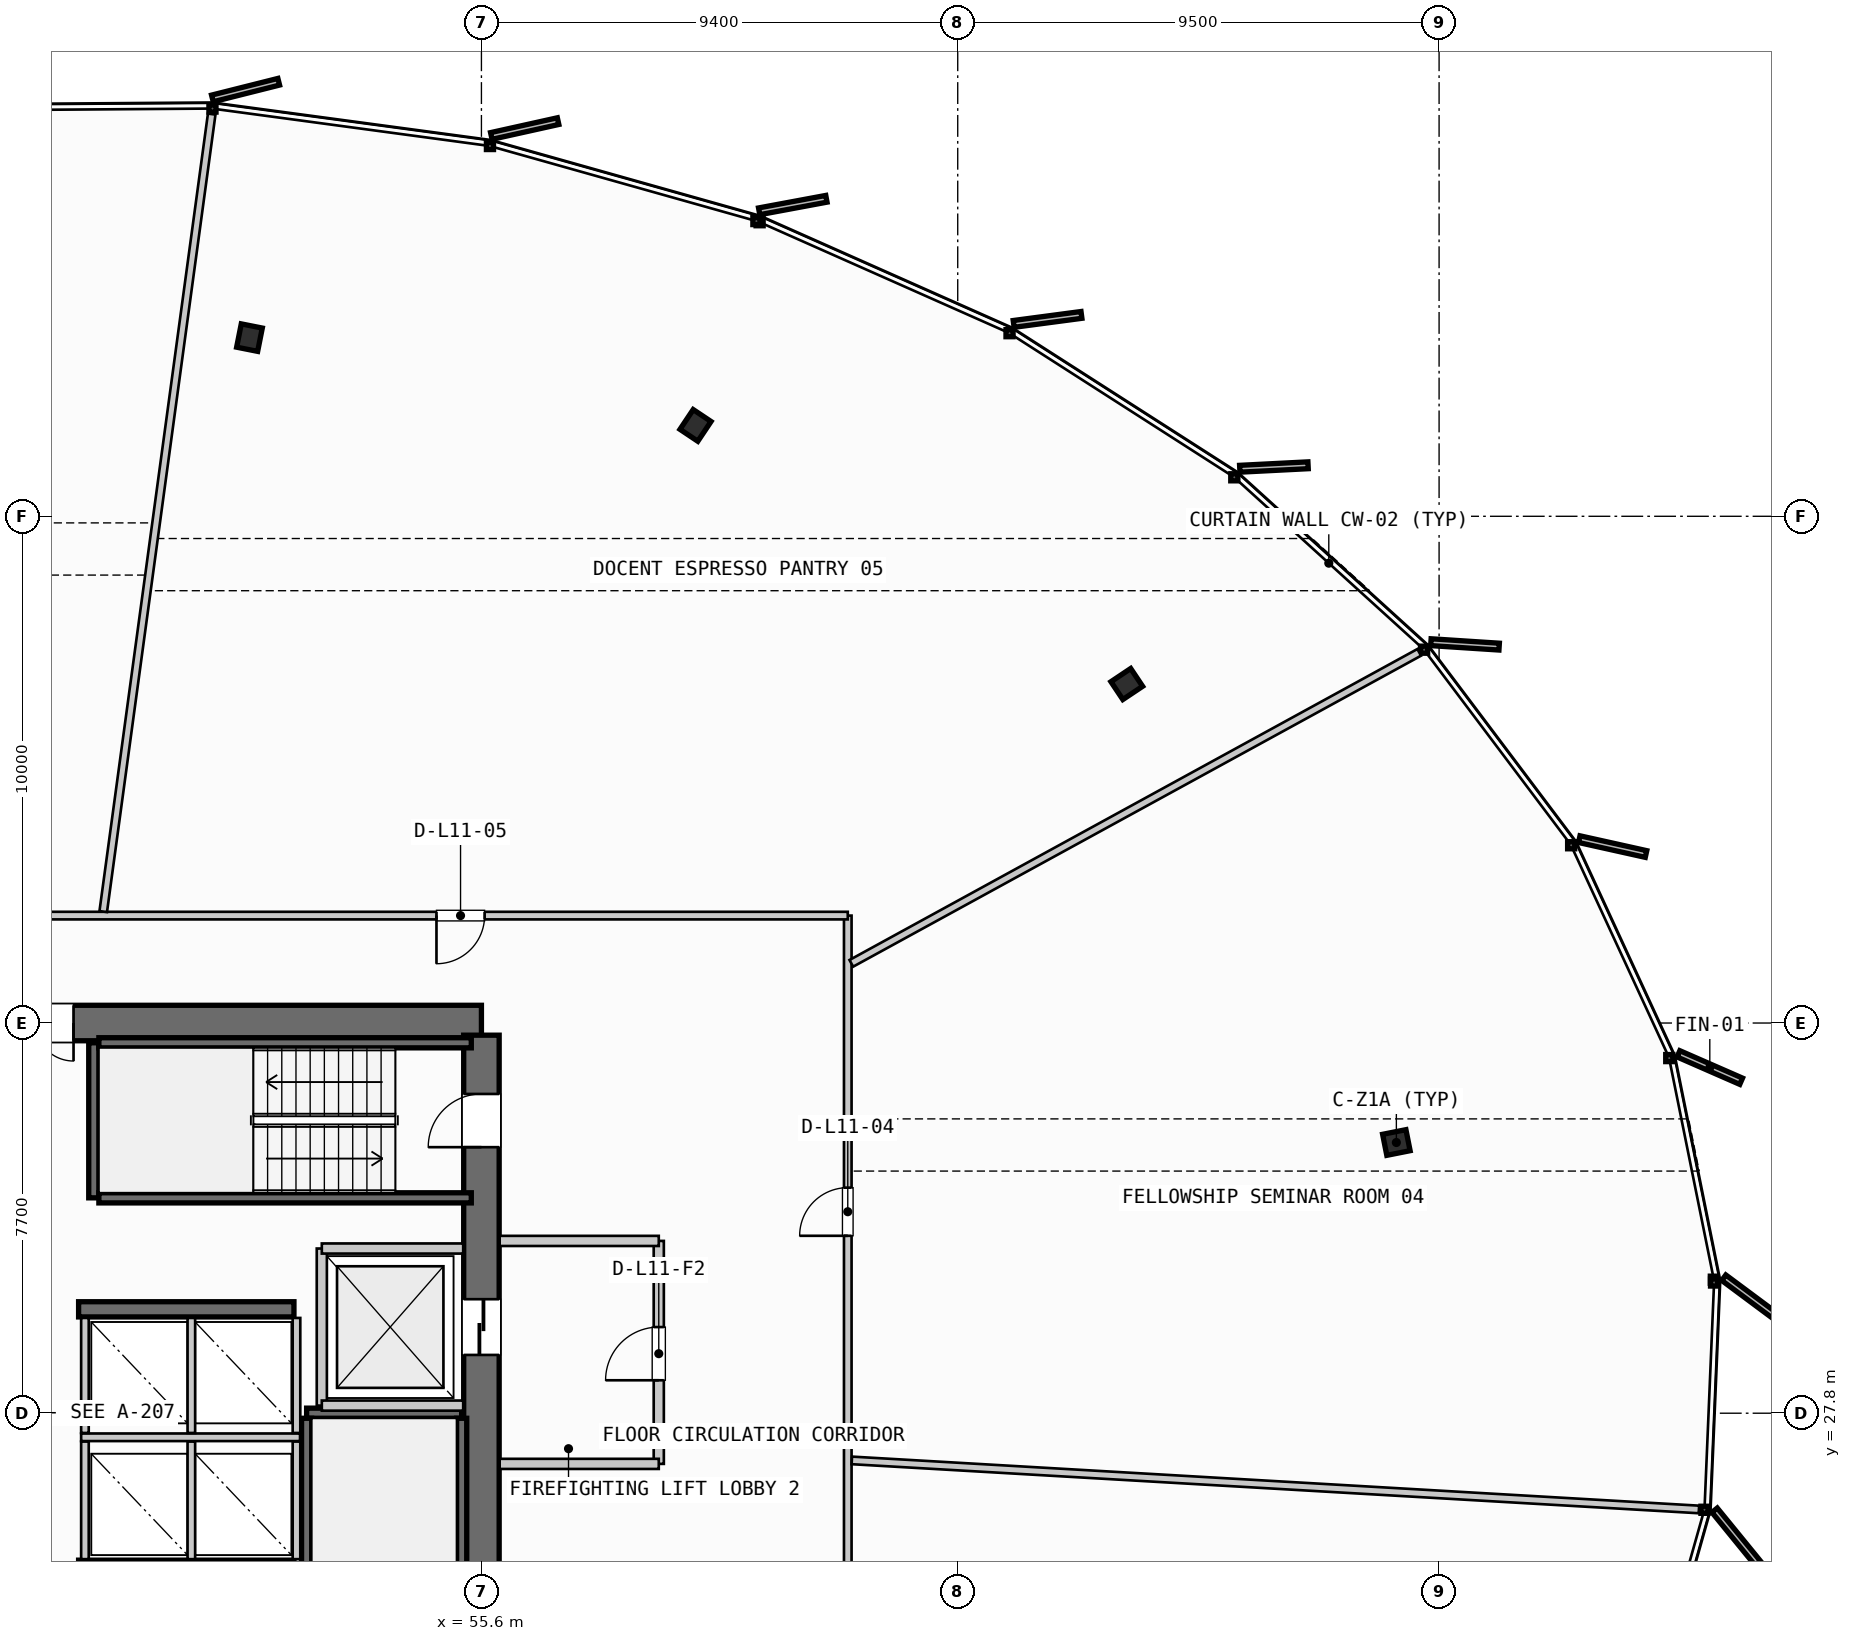
"""IFC4 building model, lengths in metres.
Left out: names, types, materials, properties, quantities, classifications, styles, units other than length and angle.
Written with IfcOpenShell. Run it as: python <this file> out.ifc"""

import sys

from ifc_helpers import new_model, si_unit, direction, frame, frame_2d, origin, origin_2d, place, context, subcontext, project, spatial, rectangle, i_section, extrude, source, transform, mapped, element, fill, save


model = new_model("IFC4")
c1 = context("Model", 3, precision=1e-05, world=origin(), true_north=direction((0.0, 1.0)))
c2 = subcontext(c1, "Body", "Model", "MODEL_VIEW")
j1 = project(units=[si_unit("LENGTHUNIT", "METRE"), si_unit("PLANEANGLEUNIT", "RADIAN")], contexts=[c1])
p1 = place(None, origin())
s1 = spatial("IfcSite", under=j1, at=p1, CompositionType="ELEMENT")
p2 = place(p1, origin())
s2 = spatial("IfcBuilding", under=s1, at=p2, CompositionType="ELEMENT")
p3 = place(p2, frame((0.0, 0.0, 48.6)))
s3 = spatial("IfcBuildingStorey", under=s2, at=p3, CompositionType="ELEMENT", Elevation=48.6)
p4 = place(p3, frame((55.6, 35.5, 0.0), z_axis=(0.0, 0.0, 1.0), x_axis=(-1.0, 0.0, 0.0)))
e1 = element("IfcWall", 1, at=p4, inside=s3, PredefinedType="SHEAR", context=c2, shape_type="SweptSolid", body=[
    extrude(rectangle(XDim=17.6, YDim=0.7, at=frame_2d((8.8, 0.0))), origin(), (0.0, 0.0, 1.0), 3.55),
])
p5 = place(p4, frame((8.05, 0.0, 0.0)))
e2 = element("IfcOpeningElement", 2, at=p5, cuts=e1, PredefinedType="OPENING", context=c2, shape_type="SweptSolid", body=[
    extrude(rectangle(XDim=1.5, YDim=2.2, at=frame_2d((0.75, 1.1))), frame((0.0, 0.36, 0.0), z_axis=(0.0, -1.0, 0.0), x_axis=(1.0, 0.0, 0.0)), (0.0, 0.0, 1.0), 0.72),
])
p6 = place(p4, frame((14.95, 0.0, 0.0)))
e3 = element("IfcOpeningElement", 3, at=p6, cuts=e1, PredefinedType="OPENING", context=c2, shape_type="SweptSolid", body=[
    extrude(rectangle(XDim=1.4, YDim=2.3, at=frame_2d((0.7, 1.15))), frame((0.0, 0.36, 0.0), z_axis=(0.0, -1.0, 0.0), x_axis=(1.0, 0.0, 0.0)), (0.0, 0.0, 1.0), 0.72),
])
p7 = place(p4, frame((12.6, 0.0, 0.0)))
e4 = element("IfcOpeningElement", 4, at=p7, cuts=e1, PredefinedType="OPENING", context=c2, shape_type="SweptSolid", body=[
    extrude(rectangle(XDim=0.95, YDim=2.15, at=frame_2d((0.475, 1.075))), frame((0.0, 0.36, 0.0), z_axis=(0.0, -1.0, 0.0), x_axis=(1.0, 0.0, 0.0)), (0.0, 0.0, 1.0), 0.72),
])
p8 = place(p4, frame((10.45, 0.0, 0.0)))
e5 = element("IfcOpeningElement", 5, at=p8, cuts=e1, PredefinedType="OPENING", context=c2, shape_type="SweptSolid", body=[
    extrude(rectangle(XDim=0.95, YDim=2.15, at=frame_2d((0.475, 1.075))), frame((0.0, 0.36, 0.0), z_axis=(0.0, -1.0, 0.0), x_axis=(1.0, 0.0, 0.0)), (0.0, 0.0, 1.0), 0.72),
])
p9 = place(p3, frame((55.6, 20.34, 0.0), z_axis=(0.0, 0.0, 1.0), x_axis=(0.0, 1.0, 0.0)))
e6 = element("IfcWall", 6, at=p9, inside=s3, PredefinedType="SHEAR", context=c2, shape_type="SweptSolid", body=[
    extrude(rectangle(XDim=14.92, YDim=0.7, at=frame_2d((7.46, 0.0))), origin(), (0.0, 0.0, 1.0), 3.55),
])
p10 = place(p9, frame((12.71, 0.0, 0.0)))
e7 = element("IfcOpeningElement", 7, at=p10, cuts=e6, PredefinedType="OPENING", context=c2, shape_type="SweptSolid", body=[
    extrude(rectangle(XDim=1.05, YDim=2.15, at=frame_2d((0.525, 1.075))), frame((0.0, 0.36, 0.0), z_axis=(0.0, -1.0, 0.0), x_axis=(1.0, 0.0, 0.0)), (0.0, 0.0, 1.0), 0.72),
])
p11 = place(p9, frame((8.61, 0.0, 0.0)))
e8 = element("IfcOpeningElement", 8, at=p11, cuts=e6, PredefinedType="OPENING", context=c2, shape_type="SweptSolid", body=[
    extrude(rectangle(XDim=1.1, YDim=2.2, at=frame_2d((0.55, 1.1))), frame((0.0, 0.36, 0.0), z_axis=(0.0, -1.0, 0.0), x_axis=(1.0, 0.0, 0.0)), (0.0, 0.0, 1.0), 0.72),
])
for number, where, z_axis, x_axis in (
    (9, (47.65, 24.75, 0.0), (0.0, 0.0, 1.0), (1.0, 0.0, 0.0)),
    (10, (47.65, 29.85, 0.0), (0.0, 0.0, 1.0), (1.0, 0.0, 0.0)),
):
    element("IfcWall", number, at=place(p3, frame(where, z_axis=z_axis, x_axis=x_axis)), inside=s3, PredefinedType="SHEAR", context=c2, shape_type="SweptSolid", body=[
        extrude(rectangle(XDim=4.25, YDim=0.3, at=frame_2d((2.125, 0.0))), origin(), (0.0, 0.0, 1.0), 3.55),
    ])
m1 = source(origin(), c2, "Body", "SweptSolid", [
    extrude(i_section(OverallWidth=0.423, OverallDepth=0.469, WebThickness=0.051, FlangeThickness=0.081, FilletRadius=0.015, at=origin_2d()), origin(), (0.0, 0.0, 1.0), 3.55),
])
for number, where, z_axis, x_axis in (
    (11, (73.657, 33.142, 0.0), (0.0, 0.0, 1.0), (0.981, 0.195, 0.0)),
    (12, (68.336, 42.19, 0.0), (0.0, 0.0, 1.0), (0.831, 0.556, 0.0)),
    (13, (59.825, 47.293, 0.0), (0.0, 0.0, 1.0), (0.556, 0.831, 0.0)),
    (14, (51.022, 49.026, 0.0), (0.0, 0.0, 1.0), (0.195, 0.981, 0.0)),
):
    element("IfcColumn", number, at=place(p3, frame(where, z_axis=z_axis, x_axis=x_axis)), inside=s3, PredefinedType="COLUMN", context=c2, shape_type="MappedRepresentation", body=[
        mapped(m1, transform((0.0, 0.0, 0.0), scale=1.0)),
    ])
p12 = place(p3, frame((52.15, 27.8, 0.0), z_axis=(0.0, 0.0, 1.0), x_axis=(1.0, 0.0, 0.0)))
e15 = element("IfcWall", 15, at=p12, inside=s3, PredefinedType="SHEAR", context=c2, shape_type="SweptSolid", body=[
    extrude(rectangle(XDim=3.06, YDim=0.2, at=frame_2d((1.53, 0.0))), origin(), (0.0, 0.0, 1.0), 3.55),
])
for number, where, z_axis, x_axis in (
    (16, (55.21, 27.7, 0.0), (0.0, 0.0, 1.0), (0.0, -1.0, 0.0)),
    (17, (52.15, 20.35, 0.0), (0.0, 0.0, 1.0), (0.0, 1.0, 0.0)),
):
    element("IfcWall", number, at=place(p3, frame(where, z_axis=z_axis, x_axis=x_axis)), inside=s3, PredefinedType="SHEAR", context=c2, shape_type="SweptSolid", body=[
        extrude(rectangle(XDim=7.35, YDim=0.2, at=frame_2d((3.675, 0.0))), origin(), (0.0, 0.0, 1.0), 3.55),
    ])
p13 = place(p3, frame((47.95, 32.05, 0.0), z_axis=(0.0, 0.0, 1.0), x_axis=(0.0, 1.0, 0.0)))
e18 = element("IfcWall", 18, at=p13, inside=s3, PredefinedType="SHEAR", context=c2, shape_type="SweptSolid", body=[
    extrude(rectangle(XDim=3.06, YDim=0.2, at=frame_2d((1.53, 0.0))), origin(), (0.0, 0.0, 1.0), 3.55),
])
for number, where, z_axis, x_axis in (
    (19, (48.05, 35.11, 0.0), (0.0, 0.0, 1.0), (1.0, 0.0, 0.0)),
    (20, (55.4, 32.05, 0.0), (0.0, 0.0, 1.0), (-1.0, 0.0, 0.0)),
):
    element("IfcWall", number, at=place(p3, frame(where, z_axis=z_axis, x_axis=x_axis)), inside=s3, PredefinedType="SHEAR", context=c2, shape_type="SweptSolid", body=[
        extrude(rectangle(XDim=7.35, YDim=0.2, at=frame_2d((3.675, 0.0))), origin(), (0.0, 0.0, 1.0), 3.55),
    ])
p14 = place(p3, frame((52.45, 27.95, 0.0), z_axis=(0.0, 0.0, 1.0), x_axis=(0.0, 1.0, 0.0)))
e21 = element("IfcWall", 21, at=p14, inside=s3, PredefinedType="PARTITIONING", context=c2, shape_type="SweptSolid", body=[
    extrude(rectangle(XDim=3.1, YDim=0.2, at=frame_2d((1.55, 0.0))), origin(), (0.0, 0.0, 1.0), 2.785),
])
for number, where, z_axis, x_axis in (
    (22, (52.45, 27.95, 0.0), (0.0, 0.0, 1.0), (1.0, 0.0, 0.0)),
    (23, (52.45, 31.05, 0.0), (0.0, 0.0, 1.0), (1.0, 0.0, 0.0)),
):
    element("IfcWall", number, at=place(p3, frame(where, z_axis=z_axis, x_axis=x_axis)), inside=s3, PredefinedType="PARTITIONING", context=c2, shape_type="SweptSolid", body=[
        extrude(rectangle(XDim=2.79, YDim=0.2, at=frame_2d((1.395, 0.0))), origin(), (0.0, 0.0, 1.0), 2.785),
    ])
p15 = place(p3, frame((59.1, 26.8, 0.0), z_axis=(0.0, 0.0, 1.0), x_axis=(0.0, 1.0, 0.0)))
e24 = element("IfcWall", 24, at=p15, inside=s3, PredefinedType="PARTITIONING", context=c2, shape_type="SweptSolid", body=[
    extrude(rectangle(XDim=4.4, YDim=0.2, at=frame_2d((2.2, 0.0))), origin(), (0.0, 0.0, 1.0), 2.785),
])
p16 = place(p15, frame((1.65, 0.0, 0.0)))
e25 = element("IfcOpeningElement", 25, at=p16, cuts=e24, PredefinedType="OPENING", context=c2, shape_type="SweptSolid", body=[
    extrude(rectangle(XDim=1.05, YDim=2.15, at=frame_2d((0.525, 1.075))), frame((0.0, 0.11, 0.0), z_axis=(0.0, -1.0, 0.0), x_axis=(1.0, 0.0, 0.0)), (0.0, 0.0, 1.0), 0.22),
])
for number, where, z_axis, x_axis in (
    (26, (55.96, 26.8, 0.0), (0.0, 0.0, 1.0), (1.0, 0.0, 0.0)),
    (27, (55.96, 31.2, 0.0), (0.0, 0.0, 1.0), (1.0, 0.0, 0.0)),
):
    element("IfcWall", number, at=place(p3, frame(where, z_axis=z_axis, x_axis=x_axis)), inside=s3, PredefinedType="PARTITIONING", context=c2, shape_type="SweptSolid", body=[
        extrude(rectangle(XDim=3.14, YDim=0.2, at=frame_2d((1.57, 0.0))), origin(), (0.0, 0.0, 1.0), 2.785),
    ])
p17 = place(p3, frame((47.7, 27.325, 0.0), z_axis=(0.0, 0.0, 1.0), x_axis=(1.0, 0.0, 0.0)))
e28 = element("IfcWall", 28, at=p17, inside=s3, PredefinedType="PARTITIONING", context=c2, shape_type="SweptSolid", body=[
    extrude(rectangle(XDim=4.32, YDim=0.15, at=frame_2d((2.16, 0.0))), origin(), (0.0, 0.0, 1.0), 2.785),
])
for number, where, z_axis, x_axis in (
    (29, (47.775, 24.92, 0.0), (0.0, 0.0, 1.0), (0.0, 1.0, 0.0)),
    (30, (49.875, 24.92, 0.0), (0.0, 0.0, 1.0), (0.0, 1.0, 0.0)),
    (31, (51.95, 24.92, 0.0), (0.0, 0.0, 1.0), (0.0, 1.0, 0.0)),
):
    element("IfcWall", number, at=place(p3, frame(where, z_axis=z_axis, x_axis=x_axis)), inside=s3, PredefinedType="PARTITIONING", context=c2, shape_type="SweptSolid", body=[
        extrude(rectangle(XDim=2.32, YDim=0.15, at=frame_2d((1.16, 0.0))), origin(), (0.0, 0.0, 1.0), 2.785),
    ])
for number, where, z_axis, x_axis in (
    (32, (47.775, 27.41, 0.0), (0.0, 0.0, 1.0), (0.0, 1.0, 0.0)),
    (33, (49.875, 27.41, 0.0), (0.0, 0.0, 1.0), (0.0, 1.0, 0.0)),
    (34, (51.95, 27.41, 0.0), (0.0, 0.0, 1.0), (0.0, 1.0, 0.0)),
):
    element("IfcWall", number, at=place(p3, frame(where, z_axis=z_axis, x_axis=x_axis)), inside=s3, PredefinedType="PARTITIONING", context=c2, shape_type="SweptSolid", body=[
        extrude(rectangle(XDim=2.27, YDim=0.15, at=frame_2d((1.135, 0.0))), origin(), (0.0, 0.0, 1.0), 2.785),
    ])
p18 = place(p3, frame((62.83, 17.14, 0.0), z_axis=(0.0, 0.0, 1.0), x_axis=(0.0, 1.0, 0.0)))
e35 = element("IfcWall", 35, at=p18, inside=s3, PredefinedType="PARTITIONING", context=c2, shape_type="SweptSolid", body=[
    extrude(rectangle(XDim=20.48, YDim=0.15, at=frame_2d((10.24, 0.0))), origin(), (0.0, 0.0, 1.0), 2.785),
])
p19 = place(p18, frame((5.249, 0.0, 0.0)))
e36 = element("IfcOpeningElement", 36, at=p19, cuts=e35, PredefinedType="OPENING", context=c2, shape_type="SweptSolid", body=[
    extrude(rectangle(XDim=0.95, YDim=2.15, at=frame_2d((0.475, 1.075))), frame((0.0, 0.085, 0.0), z_axis=(0.0, -1.0, 0.0), x_axis=(1.0, 0.0, 0.0)), (0.0, 0.0, 1.0), 0.17),
])
p20 = place(p18, frame((14.161, 0.0, 0.0)))
e37 = element("IfcOpeningElement", 37, at=p20, cuts=e35, PredefinedType="OPENING", context=c2, shape_type="SweptSolid", body=[
    extrude(rectangle(XDim=0.95, YDim=2.15, at=frame_2d((0.475, 1.075))), frame((0.0, 0.085, 0.0), z_axis=(0.0, -1.0, 0.0), x_axis=(1.0, 0.0, 0.0)), (0.0, 0.0, 1.0), 0.17),
])
p21 = place(p3, frame((62.83, 37.62, 0.0), z_axis=(0.0, 0.0, 1.0), x_axis=(-1.0, 0.0, 0.0)))
e38 = element("IfcWall", 38, at=p21, inside=s3, PredefinedType="PARTITIONING", context=c2, shape_type="SweptSolid", body=[
    extrude(rectangle(XDim=30.5, YDim=0.15, at=frame_2d((15.25, 0.0))), origin(), (0.0, 0.0, 1.0), 2.785),
])
p22 = place(p21, frame((7.167, 0.0, 0.0)))
e39 = element("IfcOpeningElement", 39, at=p22, cuts=e38, PredefinedType="OPENING", context=c2, shape_type="SweptSolid", body=[
    extrude(rectangle(XDim=0.95, YDim=2.15, at=frame_2d((0.475, 1.075))), frame((0.0, 0.085, 0.0), z_axis=(0.0, -1.0, 0.0), x_axis=(1.0, 0.0, 0.0)), (0.0, 0.0, 1.0), 0.17),
])
p23 = place(p21, frame((21.836, 0.0, 0.0)))
e40 = element("IfcOpeningElement", 40, at=p23, cuts=e38, PredefinedType="OPENING", context=c2, shape_type="SweptSolid", body=[
    extrude(rectangle(XDim=0.95, YDim=2.15, at=frame_2d((0.475, 1.075))), frame((0.0, 0.085, 0.0), z_axis=(0.0, -1.0, 0.0), x_axis=(1.0, 0.0, 0.0)), (0.0, 0.0, 1.0), 0.17),
])
p24 = place(p3, frame((62.91, 26.869, 0.0), z_axis=(0.0, 0.0, 1.0), x_axis=(0.998327003438, -0.057820361518, 0.0)))
e41 = element("IfcWall", 41, at=p24, inside=s3, PredefinedType="PARTITIONING", context=c2, shape_type="SweptSolid", body=[
    extrude(rectangle(XDim=16.746, YDim=0.15, at=frame_2d((8.373, 0.0))), origin(), (0.0, 0.0, 1.0), 2.785),
])
p25 = place(p3, frame((62.9, 36.678, 0.0), z_axis=(0.0, 0.0, 1.0), x_axis=(0.877128463717, 0.48025582572, 0.0)))
e42 = element("IfcWall", 42, at=p25, inside=s3, PredefinedType="PARTITIONING", context=c2, shape_type="SweptSolid", body=[
    extrude(rectangle(XDim=12.778, YDim=0.15, at=frame_2d((6.389, 0.0))), origin(), (0.0, 0.0, 1.0), 2.785),
])
p26 = place(p3, frame((48.136, 37.699, 0.0), z_axis=(0.0, 0.0, 1.0), x_axis=(0.134790121576, 0.990874171187, 0.0)))
e43 = element("IfcWall", 43, at=p26, inside=s3, PredefinedType="PARTITIONING", context=c2, shape_type="SweptSolid", body=[
    extrude(rectangle(XDim=15.883, YDim=0.15, at=frame_2d((7.941, 0.0))), origin(), (0.0, 0.0, 1.0), 2.785),
])
m2 = source(origin(), c2, "Body", "SweptSolid", [
    extrude(rectangle(XDim=1.05, YDim=2.15, at=frame_2d((0.525, 1.075))), frame((0.0, 0.025, 0.0), z_axis=(0.0, -1.0, 0.0), x_axis=(1.0, 0.0, 0.0)), (0.0, 0.0, 1.0), 0.05),
])
p27 = place(p10, origin())
e44 = element("IfcDoor", 44, at=p27, inside=s3, OperationType="SINGLE_SWING_LEFT", PredefinedType="DOOR", context=c2, shape_type="MappedRepresentation", body=[
    mapped(m2, transform((0.0, 0.0, 0.0), scale=1.0)),
])
fill(e7, e44)
m3 = source(origin(), c2, "Body", "SweptSolid", [
    extrude(rectangle(XDim=1.5, YDim=2.2, at=frame_2d((0.75, 1.1))), frame((0.0, 0.025, 0.0), z_axis=(0.0, -1.0, 0.0), x_axis=(1.0, 0.0, 0.0)), (0.0, 0.0, 1.0), 0.05),
])
p28 = place(p5, origin())
e45 = element("IfcDoor", 45, at=p28, inside=s3, OperationType="DOUBLE_DOOR_SINGLE_SWING", PredefinedType="DOOR", context=c2, shape_type="MappedRepresentation", body=[
    mapped(m3, transform((0.0, 0.0, 0.0), scale=1.0)),
])
fill(e2, e45)
m4 = source(origin(), c2, "Body", "SweptSolid", [
    extrude(rectangle(XDim=1.1, YDim=2.2, at=frame_2d((0.55, 1.1))), frame((0.0, 0.025, 0.0), z_axis=(0.0, -1.0, 0.0), x_axis=(1.0, 0.0, 0.0)), (0.0, 0.0, 1.0), 0.05),
])
p29 = place(p11, origin())
e46 = element("IfcDoor", 46, at=p29, inside=s3, OperationType="SLIDING_TO_RIGHT", PredefinedType="DOOR", context=c2, shape_type="MappedRepresentation", body=[
    mapped(m4, transform((0.0, 0.0, 0.0), scale=1.0)),
])
fill(e8, e46)
p30 = place(p16, origin())
e47 = element("IfcDoor", 47, at=p30, inside=s3, OperationType="SINGLE_SWING_LEFT", PredefinedType="DOOR", context=c2, shape_type="MappedRepresentation", body=[
    mapped(m2, transform((0.0, 0.0, 0.0), scale=1.0)),
])
fill(e25, e47)
m5 = source(origin(), c2, "Body", "SweptSolid", [
    extrude(rectangle(XDim=0.95, YDim=2.15, at=frame_2d((0.475, 1.075))), frame((0.0, 0.025, 0.0), z_axis=(0.0, -1.0, 0.0), x_axis=(1.0, 0.0, 0.0)), (0.0, 0.0, 1.0), 0.05),
])
p31 = place(p20, origin())
e48 = element("IfcDoor", 48, at=p31, inside=s3, OperationType="SINGLE_SWING_LEFT", PredefinedType="DOOR", context=c2, shape_type="MappedRepresentation", body=[
    mapped(m5, transform((0.0, 0.0, 0.0), scale=1.0)),
])
fill(e37, e48)
p32 = place(p22, origin())
e49 = element("IfcDoor", 49, at=p32, inside=s3, OperationType="SINGLE_SWING_RIGHT", PredefinedType="DOOR", context=c2, shape_type="MappedRepresentation", body=[
    mapped(m5, transform((0.0, 0.0, 0.0), scale=1.0)),
])
fill(e39, e49)
save(model, sys.argv[1])
